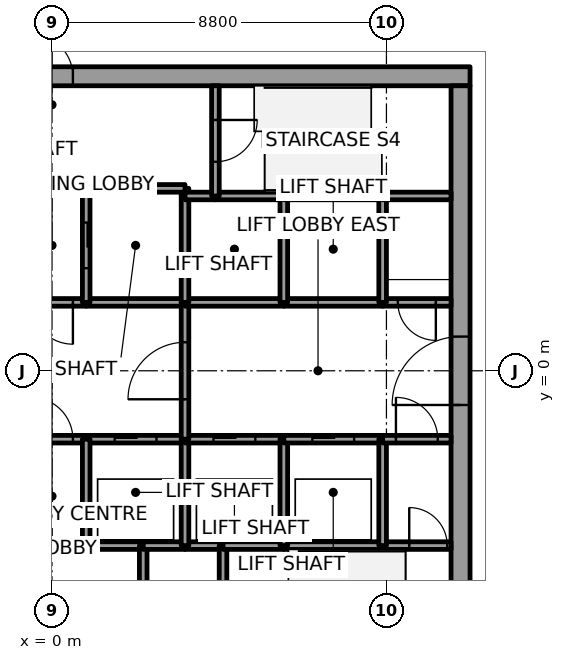
"""IFC4 building model, lengths in metres.
Left out: names, types, materials, properties, quantities, classifications, styles, units other than length and angle.
Written with IfcOpenShell. Run it as: python <this file> out.ifc"""

import sys

from ifc_helpers import new_model, si_unit, direction, frame, frame_2d, origin, place, context, subcontext, project, spatial, rectangle, extrude, element, fill, save


model = new_model("IFC4")
c1 = context("Model", 3, precision=1e-05, world=origin(), true_north=direction((0.0, 1.0)))
c2 = subcontext(c1, "Body", "Model", "MODEL_VIEW")
j1 = project(units=[si_unit("LENGTHUNIT", "METRE"), si_unit("PLANEANGLEUNIT", "RADIAN")], contexts=[c1])
p1 = place(None, origin())
s1 = spatial("IfcSite", under=j1, at=p1, CompositionType="ELEMENT")
p2 = place(p1, origin())
s2 = spatial("IfcBuilding", under=s1, at=p2, CompositionType="ELEMENT")
p3 = place(p2, frame((0.0, 0.0, 73.9)))
s3 = spatial("IfcBuildingStorey", under=s2, at=p3, CompositionType="ELEMENT", Elevation=73.9)
p4 = place(p3, frame((-11.0, 7.75, 0.0), z_axis=(0.0, 0.0, 1.0), x_axis=(1.0, 0.0, 0.0)))
e1 = element("IfcWall", 1, at=p4, inside=s3, PredefinedType="SHEAR", context=c2, shape_type="SweptSolid", body=[
    extrude(rectangle(XDim=22.0, YDim=0.5, at=frame_2d((11.0, 0.0))), origin(), (0.0, 0.0, 1.0), 3.7),
])
p5 = place(p4, frame((10.45, 0.0, 0.0)))
e2 = element("IfcOpeningElement", 2, at=p5, cuts=e1, PredefinedType="OPENING", context=c2, shape_type="SweptSolid", body=[
    extrude(rectangle(XDim=1.1, YDim=2.1, at=frame_2d((0.55, 1.05))), frame((0.0, 0.25, 0.0), z_axis=(0.0, -1.0, 0.0), x_axis=(1.0, 0.0, 0.0)), (0.0, 0.0, 1.0), 0.5),
])
p6 = place(p3, frame((10.75, -7.5, 0.0), z_axis=(0.0, 0.0, 1.0), x_axis=(0.0, 1.0, 0.0)))
e3 = element("IfcWall", 3, at=p6, inside=s3, PredefinedType="SHEAR", context=c2, shape_type="SweptSolid", body=[
    extrude(rectangle(XDim=15.0, YDim=0.5, at=frame_2d((7.5, 0.0))), origin(), (0.0, 0.0, 1.0), 3.7),
])
p7 = place(p6, frame((6.6, 0.0, 0.0)))
e4 = element("IfcOpeningElement", 4, at=p7, cuts=e3, PredefinedType="OPENING", context=c2, shape_type="SweptSolid", body=[
    extrude(rectangle(XDim=1.8, YDim=2.1, at=frame_2d((0.9, 1.05))), frame((0.0, 0.25, 0.0), z_axis=(0.0, -1.0, 0.0), x_axis=(1.0, 0.0, 0.0)), (0.0, 0.0, 1.0), 0.5),
])
p8 = place(p3, frame((-0.9, -1.8, 0.0), z_axis=(0.0, 0.0, 1.0), x_axis=(1.0, 0.0, 0.0)))
e5 = element("IfcWall", 5, at=p8, inside=s3, PredefinedType="SOLIDWALL", context=c2, shape_type="SweptSolid", body=[
    extrude(rectangle(XDim=1.8, YDim=0.2, at=frame_2d((0.9, 0.0))), origin(), (0.0, 0.0, 1.0), 3.55),
])
p9 = place(p8, frame((0.35, 0.0, 0.0)))
e6 = element("IfcOpeningElement", 6, at=p9, cuts=e5, PredefinedType="OPENING", context=c2, shape_type="SweptSolid", body=[
    extrude(rectangle(XDim=1.1, YDim=2.1, at=frame_2d((0.55, 1.05))), frame((0.0, 0.1, 0.0), z_axis=(0.0, -1.0, 0.0), x_axis=(1.0, 0.0, 0.0)), (0.0, 0.0, 1.0), 0.2),
])
p10 = place(p3, frame((0.9, 1.8, 0.0), z_axis=(0.0, 0.0, 1.0), x_axis=(-1.0, 0.0, 0.0)))
e7 = element("IfcWall", 7, at=p10, inside=s3, PredefinedType="SOLIDWALL", context=c2, shape_type="SweptSolid", body=[
    extrude(rectangle(XDim=1.8, YDim=0.2, at=frame_2d((0.9, 0.0))), origin(), (0.0, 0.0, 1.0), 3.55),
])
p11 = place(p10, frame((0.35, 0.0, 0.0)))
e8 = element("IfcOpeningElement", 8, at=p11, cuts=e7, PredefinedType="OPENING", context=c2, shape_type="SweptSolid", body=[
    extrude(rectangle(XDim=1.1, YDim=2.1, at=frame_2d((0.55, 1.05))), frame((0.0, 0.1, 0.0), z_axis=(0.0, -1.0, 0.0), x_axis=(1.0, 0.0, 0.0)), (0.0, 0.0, 1.0), 0.2),
])
p12 = place(p3, frame((0.9, -1.8, 0.0), z_axis=(0.0, 0.0, 1.0), x_axis=(1.0, 0.0, 0.0)))
e9 = element("IfcWall", 9, at=p12, inside=s3, PredefinedType="SOLIDWALL", context=c2, shape_type="SweptSolid", body=[
    extrude(rectangle(XDim=2.6, YDim=0.2, at=frame_2d((1.3, 0.0))), origin(), (0.0, 0.0, 1.0), 3.55),
])
p13 = place(p12, frame((0.75, 0.0, 0.0)))
e10 = element("IfcOpeningElement", 10, at=p13, cuts=e9, PredefinedType="OPENING", context=c2, shape_type="SweptSolid", body=[
    extrude(rectangle(XDim=1.1, YDim=2.1, at=frame_2d((0.55, 1.05))), frame((0.0, 0.1, 0.0), z_axis=(0.0, -1.0, 0.0), x_axis=(1.0, 0.0, 0.0)), (0.0, 0.0, 1.0), 0.2),
])
p14 = place(p3, frame((0.9, -1.8, 0.0), z_axis=(0.0, 0.0, 1.0), x_axis=(0.0, -1.0, 0.0)))
e11 = element("IfcWall", 11, at=p14, inside=s3, PredefinedType="SOLIDWALL", context=c2, shape_type="SweptSolid", body=[
    extrude(rectangle(XDim=2.8, YDim=0.2, at=frame_2d((1.4, 0.0))), origin(), (0.0, 0.0, 1.0), 3.55),
])
p15 = place(p3, frame((0.9, -4.6, 0.0), z_axis=(0.0, 0.0, 1.0), x_axis=(1.0, 0.0, 0.0)))
e12 = element("IfcWall", 12, at=p15, inside=s3, PredefinedType="SOLIDWALL", context=c2, shape_type="SweptSolid", body=[
    extrude(rectangle(XDim=1.5, YDim=0.2, at=frame_2d((0.75, 0.0))), origin(), (0.0, 0.0, 1.0), 3.55),
])
p16 = place(p3, frame((3.5, 1.8, 0.0), z_axis=(0.0, 0.0, 1.0), x_axis=(-1.0, 0.0, 0.0)))
e13 = element("IfcWall", 13, at=p16, inside=s3, PredefinedType="SOLIDWALL", context=c2, shape_type="SweptSolid", body=[
    extrude(rectangle(XDim=2.6, YDim=0.2, at=frame_2d((1.3, 0.0))), origin(), (0.0, 0.0, 1.0), 3.55),
])
p17 = place(p3, frame((3.5, 4.6, 0.0), z_axis=(0.0, 0.0, 1.0), x_axis=(0.0, 1.0, 0.0)))
e14 = element("IfcWall", 14, at=p17, inside=s3, PredefinedType="SOLIDWALL", context=c2, shape_type="SweptSolid", body=[
    extrude(rectangle(XDim=0.2, YDim=0.2, at=frame_2d((0.1, 0.0))), origin(), (0.0, 0.0, 1.0), 3.55),
])
p18 = place(p3, frame((3.5, 4.8, 0.0), z_axis=(0.0, 0.0, 1.0), x_axis=(-1.0, 0.0, 0.0)))
e15 = element("IfcWall", 15, at=p18, inside=s3, PredefinedType="SOLIDWALL", context=c2, shape_type="SweptSolid", body=[
    extrude(rectangle(XDim=2.6, YDim=0.2, at=frame_2d((1.3, 0.0))), origin(), (0.0, 0.0, 1.0), 3.55),
])
p19 = place(p3, frame((0.9, 4.8, 0.0), z_axis=(0.0, 0.0, 1.0), x_axis=(0.0, -1.0, 0.0)))
e16 = element("IfcWall", 16, at=p19, inside=s3, PredefinedType="SOLIDWALL", context=c2, shape_type="SweptSolid", body=[
    extrude(rectangle(XDim=3.0, YDim=0.2, at=frame_2d((1.5, 0.0))), origin(), (0.0, 0.0, 1.0), 3.55),
])
p20 = place(p19, frame((0.9, 0.0, 0.0)))
e17 = element("IfcOpeningElement", 17, at=p20, cuts=e16, PredefinedType="OPENING", context=c2, shape_type="SweptSolid", body=[
    extrude(rectangle(XDim=1.2, YDim=2.1, at=frame_2d((0.6, 1.05))), frame((0.0, 0.1, 0.0), z_axis=(0.0, -1.0, 0.0), x_axis=(1.0, 0.0, 0.0)), (0.0, 0.0, 1.0), 0.2),
])
p21 = place(p3, frame((2.4, -4.6, 0.0), z_axis=(0.0, 0.0, 1.0), x_axis=(0.0, -1.0, 0.0)))
e18 = element("IfcWall", 18, at=p21, inside=s3, PredefinedType="SOLIDWALL", context=c2, shape_type="SweptSolid", body=[
    extrude(rectangle(XDim=2.9, YDim=0.2, at=frame_2d((1.45, 0.0))), origin(), (0.0, 0.0, 1.0), 3.55),
])
p22 = place(p21, frame((1.0, 0.0, 0.0)))
e19 = element("IfcOpeningElement", 19, at=p22, cuts=e18, PredefinedType="OPENING", context=c2, shape_type="SweptSolid", body=[
    extrude(rectangle(XDim=0.9, YDim=2.1, at=frame_2d((0.45, 1.05))), frame((0.0, 0.1, 0.0), z_axis=(0.0, -1.0, 0.0), x_axis=(1.0, 0.0, 0.0)), (0.0, 0.0, 1.0), 0.2),
])
p23 = place(p3, frame((3.5, -4.6, 0.0), z_axis=(0.0, 0.0, 1.0), x_axis=(-1.0, 0.0, 0.0)))
e20 = element("IfcWall", 20, at=p23, inside=s3, PredefinedType="SOLIDWALL", context=c2, shape_type="SweptSolid", body=[
    extrude(rectangle(XDim=1.1, YDim=0.2, at=frame_2d((0.55, 0.0))), origin(), (0.0, 0.0, 1.0), 3.55),
])
p24 = place(p3, frame((4.5, -4.6, 0.0), z_axis=(0.0, 0.0, 1.0), x_axis=(-1.0, 0.0, 0.0)))
e21 = element("IfcWall", 21, at=p24, inside=s3, PredefinedType="SOLIDWALL", context=c2, shape_type="SweptSolid", body=[
    extrude(rectangle(XDim=1.0, YDim=0.2, at=frame_2d((0.5, 0.0))), origin(), (0.0, 0.0, 1.0), 3.55),
])
p25 = place(p3, frame((3.5, -4.6, 0.0), z_axis=(0.0, 0.0, 1.0), x_axis=(0.0, 1.0, 0.0)))
e22 = element("IfcWall", 22, at=p25, inside=s3, PredefinedType="SOLIDWALL", context=c2, shape_type="SweptSolid", body=[
    extrude(rectangle(XDim=2.8, YDim=0.2, at=frame_2d((1.4, 0.0))), origin(), (0.0, 0.0, 1.0), 3.55),
])
p26 = place(p3, frame((3.5, -1.8, 0.0), z_axis=(0.0, 0.0, 1.0), x_axis=(1.0, 0.0, 0.0)))
e23 = element("IfcWall", 23, at=p26, inside=s3, PredefinedType="SOLIDWALL", context=c2, shape_type="SweptSolid", body=[
    extrude(rectangle(XDim=2.6, YDim=0.2, at=frame_2d((1.3, 0.0))), origin(), (0.0, 0.0, 1.0), 3.55),
])
p27 = place(p26, frame((0.75, 0.0, 0.0)))
e24 = element("IfcOpeningElement", 24, at=p27, cuts=e23, PredefinedType="OPENING", context=c2, shape_type="SweptSolid", body=[
    extrude(rectangle(XDim=1.1, YDim=2.1, at=frame_2d((0.55, 1.05))), frame((0.0, 0.1, 0.0), z_axis=(0.0, -1.0, 0.0), x_axis=(1.0, 0.0, 0.0)), (0.0, 0.0, 1.0), 0.2),
])
p28 = place(p3, frame((3.5, -1.8, 0.0), z_axis=(0.0, 0.0, 1.0), x_axis=(0.0, 1.0, 0.0)))
e25 = element("IfcWall", 25, at=p28, inside=s3, PredefinedType="SOLIDWALL", context=c2, shape_type="SweptSolid", body=[
    extrude(rectangle(XDim=3.6, YDim=0.2, at=frame_2d((1.8, 0.0))), origin(), (0.0, 0.0, 1.0), 3.55),
])
p29 = place(p28, frame((1.05, 0.0, 0.0)))
e26 = element("IfcOpeningElement", 26, at=p29, cuts=e25, PredefinedType="OPENING", context=c2, shape_type="SweptSolid", body=[
    extrude(rectangle(XDim=1.5, YDim=2.1, at=frame_2d((0.75, 1.05))), frame((0.0, 0.1, 0.0), z_axis=(0.0, -1.0, 0.0), x_axis=(1.0, 0.0, 0.0)), (0.0, 0.0, 1.0), 0.2),
])
p30 = place(p3, frame((6.1, 1.8, 0.0), z_axis=(0.0, 0.0, 1.0), x_axis=(-1.0, 0.0, 0.0)))
e27 = element("IfcWall", 27, at=p30, inside=s3, PredefinedType="SOLIDWALL", context=c2, shape_type="SweptSolid", body=[
    extrude(rectangle(XDim=2.6, YDim=0.2, at=frame_2d((1.3, 0.0))), origin(), (0.0, 0.0, 1.0), 3.55),
])
p31 = place(p3, frame((3.5, 1.8, 0.0), z_axis=(0.0, 0.0, 1.0), x_axis=(0.0, 1.0, 0.0)))
e28 = element("IfcWall", 28, at=p31, inside=s3, PredefinedType="SOLIDWALL", context=c2, shape_type="SweptSolid", body=[
    extrude(rectangle(XDim=2.8, YDim=0.2, at=frame_2d((1.4, 0.0))), origin(), (0.0, 0.0, 1.0), 3.55),
])
p32 = place(p3, frame((4.3, 4.6, 0.0), z_axis=(0.0, 0.0, 1.0), x_axis=(-1.0, 0.0, 0.0)))
e29 = element("IfcWall", 29, at=p32, inside=s3, PredefinedType="SOLIDWALL", context=c2, shape_type="SweptSolid", body=[
    extrude(rectangle(XDim=0.8, YDim=0.2, at=frame_2d((0.4, 0.0))), origin(), (0.0, 0.0, 1.0), 3.55),
])
p33 = place(p3, frame((6.1, 4.6, 0.0), z_axis=(0.0, 0.0, 1.0), x_axis=(-1.0, 0.0, 0.0)))
e30 = element("IfcWall", 30, at=p33, inside=s3, PredefinedType="SOLIDWALL", context=c2, shape_type="SweptSolid", body=[
    extrude(rectangle(XDim=1.8, YDim=0.2, at=frame_2d((0.9, 0.0))), origin(), (0.0, 0.0, 1.0), 3.55),
])
p34 = place(p3, frame((4.3, 7.5, 0.0), z_axis=(0.0, 0.0, 1.0), x_axis=(0.0, -1.0, 0.0)))
e31 = element("IfcWall", 31, at=p34, inside=s3, PredefinedType="SOLIDWALL", context=c2, shape_type="SweptSolid", body=[
    extrude(rectangle(XDim=2.9, YDim=0.2, at=frame_2d((1.45, 0.0))), origin(), (0.0, 0.0, 1.0), 3.55),
])
p35 = place(p34, frame((0.9, 0.0, 0.0)))
e32 = element("IfcOpeningElement", 32, at=p35, cuts=e31, PredefinedType="OPENING", context=c2, shape_type="SweptSolid", body=[
    extrude(rectangle(XDim=1.1, YDim=2.1, at=frame_2d((0.55, 1.05))), frame((0.0, 0.1, 0.0), z_axis=(0.0, -1.0, 0.0), x_axis=(1.0, 0.0, 0.0)), (0.0, 0.0, 1.0), 0.2),
])
p36 = place(p3, frame((4.5, -7.5, 0.0), z_axis=(0.0, 0.0, 1.0), x_axis=(0.0, 1.0, 0.0)))
e33 = element("IfcWall", 33, at=p36, inside=s3, PredefinedType="SOLIDWALL", context=c2, shape_type="SweptSolid", body=[
    extrude(rectangle(XDim=2.9, YDim=0.2, at=frame_2d((1.45, 0.0))), origin(), (0.0, 0.0, 1.0), 3.55),
])
p37 = place(p3, frame((4.5, -4.6, 0.0), z_axis=(0.0, 0.0, 1.0), x_axis=(1.0, 0.0, 0.0)))
e34 = element("IfcWall", 34, at=p37, inside=s3, PredefinedType="SOLIDWALL", context=c2, shape_type="SweptSolid", body=[
    extrude(rectangle(XDim=1.6, YDim=0.2, at=frame_2d((0.8, 0.0))), origin(), (0.0, 0.0, 1.0), 3.55),
])
p38 = place(p3, frame((6.1, -4.6, 0.0), z_axis=(0.0, 0.0, 1.0), x_axis=(1.0, 0.0, 0.0)))
e35 = element("IfcWall", 35, at=p38, inside=s3, PredefinedType="SOLIDWALL", context=c2, shape_type="SweptSolid", body=[
    extrude(rectangle(XDim=2.6, YDim=0.2, at=frame_2d((1.3, 0.0))), origin(), (0.0, 0.0, 1.0), 3.55),
])
p39 = place(p3, frame((6.1, -4.6, 0.0), z_axis=(0.0, 0.0, 1.0), x_axis=(0.0, 1.0, 0.0)))
e36 = element("IfcWall", 36, at=p39, inside=s3, PredefinedType="SOLIDWALL", context=c2, shape_type="SweptSolid", body=[
    extrude(rectangle(XDim=2.8, YDim=0.2, at=frame_2d((1.4, 0.0))), origin(), (0.0, 0.0, 1.0), 3.55),
])
p40 = place(p3, frame((6.1, -1.8, 0.0), z_axis=(0.0, 0.0, 1.0), x_axis=(1.0, 0.0, 0.0)))
e37 = element("IfcWall", 37, at=p40, inside=s3, PredefinedType="SOLIDWALL", context=c2, shape_type="SweptSolid", body=[
    extrude(rectangle(XDim=2.6, YDim=0.2, at=frame_2d((1.3, 0.0))), origin(), (0.0, 0.0, 1.0), 3.55),
])
p41 = place(p40, frame((0.75, 0.0, 0.0)))
e38 = element("IfcOpeningElement", 38, at=p41, cuts=e37, PredefinedType="OPENING", context=c2, shape_type="SweptSolid", body=[
    extrude(rectangle(XDim=1.1, YDim=2.1, at=frame_2d((0.55, 1.05))), frame((0.0, 0.1, 0.0), z_axis=(0.0, -1.0, 0.0), x_axis=(1.0, 0.0, 0.0)), (0.0, 0.0, 1.0), 0.2),
])
p42 = place(p3, frame((8.7, 1.8, 0.0), z_axis=(0.0, 0.0, 1.0), x_axis=(-1.0, 0.0, 0.0)))
e39 = element("IfcWall", 39, at=p42, inside=s3, PredefinedType="SOLIDWALL", context=c2, shape_type="SweptSolid", body=[
    extrude(rectangle(XDim=2.6, YDim=0.2, at=frame_2d((1.3, 0.0))), origin(), (0.0, 0.0, 1.0), 3.55),
])
p43 = place(p3, frame((6.1, 1.8, 0.0), z_axis=(0.0, 0.0, 1.0), x_axis=(0.0, 1.0, 0.0)))
e40 = element("IfcWall", 40, at=p43, inside=s3, PredefinedType="SOLIDWALL", context=c2, shape_type="SweptSolid", body=[
    extrude(rectangle(XDim=2.8, YDim=0.2, at=frame_2d((1.4, 0.0))), origin(), (0.0, 0.0, 1.0), 3.55),
])
p44 = place(p3, frame((8.7, 4.6, 0.0), z_axis=(0.0, 0.0, 1.0), x_axis=(-1.0, 0.0, 0.0)))
e41 = element("IfcWall", 41, at=p44, inside=s3, PredefinedType="SOLIDWALL", context=c2, shape_type="SweptSolid", body=[
    extrude(rectangle(XDim=2.6, YDim=0.2, at=frame_2d((1.3, 0.0))), origin(), (0.0, 0.0, 1.0), 3.55),
])
p45 = place(p3, frame((8.7, -4.6, 0.0), z_axis=(0.0, 0.0, 1.0), x_axis=(1.0, 0.0, 0.0)))
e42 = element("IfcWall", 42, at=p45, inside=s3, PredefinedType="SOLIDWALL", context=c2, shape_type="SweptSolid", body=[
    extrude(rectangle(XDim=1.8, YDim=0.2, at=frame_2d((0.9, 0.0))), origin(), (0.0, 0.0, 1.0), 3.55),
])
p46 = place(p45, frame((0.7, 0.0, 0.0)))
e43 = element("IfcOpeningElement", 43, at=p46, cuts=e42, PredefinedType="OPENING", context=c2, shape_type="SweptSolid", body=[
    extrude(rectangle(XDim=1.0, YDim=2.1, at=frame_2d((0.5, 1.05))), frame((0.0, 0.1, 0.0), z_axis=(0.0, -1.0, 0.0), x_axis=(1.0, 0.0, 0.0)), (0.0, 0.0, 1.0), 0.2),
])
p47 = place(p3, frame((8.7, -1.8, 0.0), z_axis=(0.0, 0.0, 1.0), x_axis=(0.0, -1.0, 0.0)))
e44 = element("IfcWall", 44, at=p47, inside=s3, PredefinedType="SOLIDWALL", context=c2, shape_type="SweptSolid", body=[
    extrude(rectangle(XDim=2.8, YDim=0.2, at=frame_2d((1.4, 0.0))), origin(), (0.0, 0.0, 1.0), 3.55),
])
p48 = place(p3, frame((8.7, -1.8, 0.0), z_axis=(0.0, 0.0, 1.0), x_axis=(1.0, 0.0, 0.0)))
e45 = element("IfcWall", 45, at=p48, inside=s3, PredefinedType="SOLIDWALL", context=c2, shape_type="SweptSolid", body=[
    extrude(rectangle(XDim=1.8, YDim=0.2, at=frame_2d((0.9, 0.0))), origin(), (0.0, 0.0, 1.0), 3.55),
])
p49 = place(p48, frame((0.35, 0.0, 0.0)))
e46 = element("IfcOpeningElement", 46, at=p49, cuts=e45, PredefinedType="OPENING", context=c2, shape_type="SweptSolid", body=[
    extrude(rectangle(XDim=1.1, YDim=2.1, at=frame_2d((0.55, 1.05))), frame((0.0, 0.1, 0.0), z_axis=(0.0, -1.0, 0.0), x_axis=(1.0, 0.0, 0.0)), (0.0, 0.0, 1.0), 0.2),
])
p50 = place(p3, frame((10.5, 1.8, 0.0), z_axis=(0.0, 0.0, 1.0), x_axis=(-1.0, 0.0, 0.0)))
e47 = element("IfcWall", 47, at=p50, inside=s3, PredefinedType="SOLIDWALL", context=c2, shape_type="SweptSolid", body=[
    extrude(rectangle(XDim=1.8, YDim=0.2, at=frame_2d((0.9, 0.0))), origin(), (0.0, 0.0, 1.0), 3.55),
])
p51 = place(p50, frame((0.4, 0.0, 0.0)))
e48 = element("IfcOpeningElement", 48, at=p51, cuts=e47, PredefinedType="OPENING", context=c2, shape_type="SweptSolid", body=[
    extrude(rectangle(XDim=1.0, YDim=2.1, at=frame_2d((0.5, 1.05))), frame((0.0, 0.1, 0.0), z_axis=(0.0, -1.0, 0.0), x_axis=(1.0, 0.0, 0.0)), (0.0, 0.0, 1.0), 0.2),
])
p52 = place(p3, frame((8.7, 4.6, 0.0), z_axis=(0.0, 0.0, 1.0), x_axis=(0.0, -1.0, 0.0)))
e49 = element("IfcWall", 49, at=p52, inside=s3, PredefinedType="SOLIDWALL", context=c2, shape_type="SweptSolid", body=[
    extrude(rectangle(XDim=2.8, YDim=0.2, at=frame_2d((1.4, 0.0))), origin(), (0.0, 0.0, 1.0), 3.55),
])
p53 = place(p3, frame((10.5, 4.6, 0.0), z_axis=(0.0, 0.0, 1.0), x_axis=(-1.0, 0.0, 0.0)))
e50 = element("IfcWall", 50, at=p53, inside=s3, PredefinedType="SOLIDWALL", context=c2, shape_type="SweptSolid", body=[
    extrude(rectangle(XDim=1.8, YDim=0.2, at=frame_2d((0.9, 0.0))), origin(), (0.0, 0.0, 1.0), 3.55),
])
p54 = place(p13, origin())
e51 = element("IfcDoor", 51, at=p54, inside=s3, OperationType="SLIDING_TO_LEFT", PredefinedType="DOOR", context=c2, shape_type="SweptSolid", body=[
    extrude(rectangle(XDim=1.1, YDim=2.1, at=frame_2d((0.55, 1.05))), frame((0.0, 0.025, 0.0), z_axis=(0.0, -1.0, 0.0), x_axis=(1.0, 0.0, 0.0)), (0.0, 0.0, 1.0), 0.05),
])
fill(e10, e51)
p55 = place(p27, origin())
e52 = element("IfcDoor", 52, at=p55, inside=s3, OperationType="SLIDING_TO_RIGHT", PredefinedType="DOOR", context=c2, shape_type="SweptSolid", body=[
    extrude(rectangle(XDim=1.1, YDim=2.1, at=frame_2d((0.55, 1.05))), frame((0.0, 0.025, 0.0), z_axis=(0.0, -1.0, 0.0), x_axis=(1.0, 0.0, 0.0)), (0.0, 0.0, 1.0), 0.05),
])
fill(e24, e52)
p56 = place(p41, origin())
e53 = element("IfcDoor", 53, at=p56, inside=s3, OperationType="SLIDING_TO_RIGHT", PredefinedType="DOOR", context=c2, shape_type="SweptSolid", body=[
    extrude(rectangle(XDim=1.1, YDim=2.1, at=frame_2d((0.55, 1.05))), frame((0.0, 0.025, 0.0), z_axis=(0.0, -1.0, 0.0), x_axis=(1.0, 0.0, 0.0)), (0.0, 0.0, 1.0), 0.05),
])
fill(e38, e53)
p57 = place(p20, origin())
e54 = element("IfcDoor", 54, at=p57, inside=s3, OperationType="SLIDING_TO_LEFT", PredefinedType="DOOR", context=c2, shape_type="SweptSolid", body=[
    extrude(rectangle(XDim=1.2, YDim=2.1, at=frame_2d((0.6, 1.05))), frame((0.0, 0.025, 0.0), z_axis=(0.0, -1.0, 0.0), x_axis=(1.0, 0.0, 0.0)), (0.0, 0.0, 1.0), 0.05),
])
fill(e17, e54)
p58 = place(p29, origin())
e55 = element("IfcDoor", 55, at=p58, inside=s3, OperationType="DOUBLE_DOOR_SINGLE_SWING", PredefinedType="DOOR", context=c2, shape_type="SweptSolid", body=[
    extrude(rectangle(XDim=1.5, YDim=2.1, at=frame_2d((0.75, 1.05))), frame((0.0, 0.025, 0.0), z_axis=(0.0, -1.0, 0.0), x_axis=(1.0, 0.0, 0.0)), (0.0, 0.0, 1.0), 0.05),
])
fill(e26, e55)
p59 = place(p49, origin())
e56 = element("IfcDoor", 56, at=p59, inside=s3, OperationType="SINGLE_SWING_LEFT", PredefinedType="DOOR", context=c2, shape_type="SweptSolid", body=[
    extrude(rectangle(XDim=1.1, YDim=2.1, at=frame_2d((0.55, 1.05))), frame((0.0, 0.025, 0.0), z_axis=(0.0, -1.0, 0.0), x_axis=(1.0, 0.0, 0.0)), (0.0, 0.0, 1.0), 0.05),
])
fill(e46, e56)
p60 = place(p11, origin())
e57 = element("IfcDoor", 57, at=p60, inside=s3, OperationType="SINGLE_SWING_RIGHT", PredefinedType="DOOR", context=c2, shape_type="SweptSolid", body=[
    extrude(rectangle(XDim=1.1, YDim=2.1, at=frame_2d((0.55, 1.05))), frame((0.0, 0.025, 0.0), z_axis=(0.0, -1.0, 0.0), x_axis=(1.0, 0.0, 0.0)), (0.0, 0.0, 1.0), 0.05),
])
fill(e8, e57)
p61 = place(p9, origin())
e58 = element("IfcDoor", 58, at=p61, inside=s3, OperationType="SINGLE_SWING_RIGHT", PredefinedType="DOOR", context=c2, shape_type="SweptSolid", body=[
    extrude(rectangle(XDim=1.1, YDim=2.1, at=frame_2d((0.55, 1.05))), frame((0.0, 0.025, 0.0), z_axis=(0.0, -1.0, 0.0), x_axis=(1.0, 0.0, 0.0)), (0.0, 0.0, 1.0), 0.05),
])
fill(e6, e58)
p62 = place(p51, origin())
e59 = element("IfcDoor", 59, at=p62, inside=s3, OperationType="SINGLE_SWING_RIGHT", PredefinedType="DOOR", context=c2, shape_type="SweptSolid", body=[
    extrude(rectangle(XDim=1.0, YDim=2.1, at=frame_2d((0.5, 1.05))), frame((0.0, 0.025, 0.0), z_axis=(0.0, -1.0, 0.0), x_axis=(1.0, 0.0, 0.0)), (0.0, 0.0, 1.0), 0.05),
])
fill(e48, e59)
p63 = place(p46, origin())
e60 = element("IfcDoor", 60, at=p63, inside=s3, OperationType="SINGLE_SWING_RIGHT", PredefinedType="DOOR", context=c2, shape_type="SweptSolid", body=[
    extrude(rectangle(XDim=1.0, YDim=2.1, at=frame_2d((0.5, 1.05))), frame((0.0, 0.025, 0.0), z_axis=(0.0, -1.0, 0.0), x_axis=(1.0, 0.0, 0.0)), (0.0, 0.0, 1.0), 0.05),
])
fill(e43, e60)
p64 = place(p35, origin())
e61 = element("IfcDoor", 61, at=p64, inside=s3, OperationType="SINGLE_SWING_LEFT", PredefinedType="DOOR", context=c2, shape_type="SweptSolid", body=[
    extrude(rectangle(XDim=1.1, YDim=2.1, at=frame_2d((0.55, 1.05))), frame((0.0, 0.025, 0.0), z_axis=(0.0, -1.0, 0.0), x_axis=(1.0, 0.0, 0.0)), (0.0, 0.0, 1.0), 0.05),
])
fill(e32, e61)
p65 = place(p7, origin())
e62 = element("IfcDoor", 62, at=p65, inside=s3, OperationType="DOUBLE_DOOR_SINGLE_SWING", PredefinedType="DOOR", context=c2, shape_type="SweptSolid", body=[
    extrude(rectangle(XDim=1.8, YDim=2.1, at=frame_2d((0.9, 1.05))), frame((0.0, 0.025, 0.0), z_axis=(0.0, -1.0, 0.0), x_axis=(1.0, 0.0, 0.0)), (0.0, 0.0, 1.0), 0.05),
])
fill(e4, e62)
p66 = place(p5, origin())
e63 = element("IfcDoor", 63, at=p66, inside=s3, OperationType="SINGLE_SWING_RIGHT", PredefinedType="DOOR", context=c2, shape_type="SweptSolid", body=[
    extrude(rectangle(XDim=1.1, YDim=2.1, at=frame_2d((0.55, 1.05))), frame((0.0, 0.025, 0.0), z_axis=(0.0, -1.0, 0.0), x_axis=(1.0, 0.0, 0.0)), (0.0, 0.0, 1.0), 0.05),
])
fill(e2, e63)
save(model, sys.argv[1])
